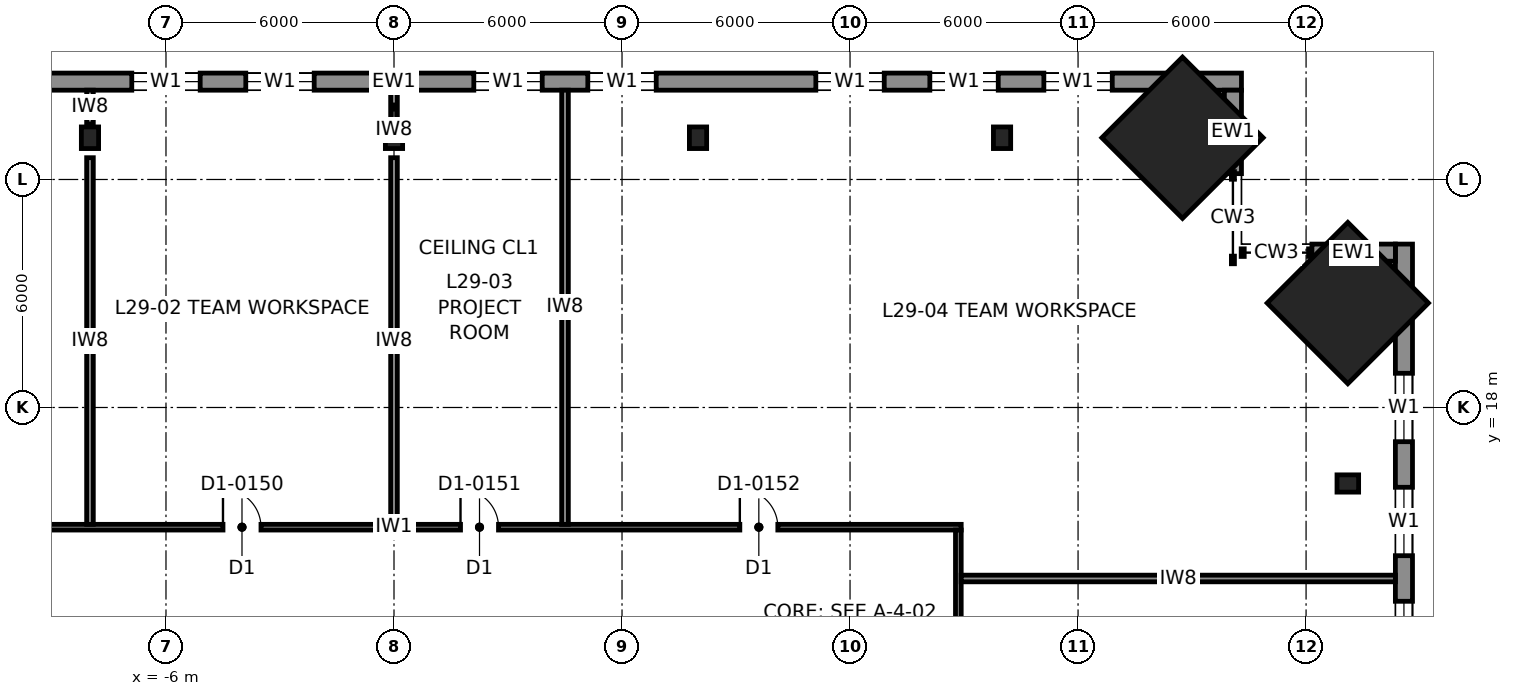
"""IFC4 building model, lengths in metres.
Left out: names, types, materials, properties, quantities, classifications, styles, units other than length and angle.
Written with IfcOpenShell. Run it as: python <this file> out.ifc"""

import sys

from ifc_helpers import new_model, si_unit, direction, frame, frame_2d, origin, origin_2d, place, context, subcontext, project, spatial, rectangle, i_section, extrude, element, fill, save


model = new_model("IFC4")
c1 = context("Model", 3, precision=1e-05, world=origin(), true_north=direction((0.0, 1.0)))
c2 = subcontext(c1, "Body", "Model", "MODEL_VIEW")
j1 = project(units=[si_unit("LENGTHUNIT", "METRE"), si_unit("PLANEANGLEUNIT", "RADIAN")], contexts=[c1])
p1 = place(None, origin())
s1 = spatial("IfcSite", under=j1, at=p1, CompositionType="ELEMENT")
p2 = place(p1, origin())
s2 = spatial("IfcBuilding", under=s1, at=p2, CompositionType="ELEMENT")
p3 = place(p2, frame((0.0, 0.0, 143.8)))
s3 = spatial("IfcBuildingStorey", under=s2, at=p3, CompositionType="ELEMENT", Elevation=143.8)
for number, where, z_axis, x_axis in (
    (1, (20.748, 25.098, 0.0), (-0.04, -0.04, 0.998), (0.708, -0.707, 0.0)),
    (2, (25.098, 20.748, 0.0), (-0.04, -0.04, 0.998), (0.707, -0.708, 0.0)),
):
    element("IfcColumn", number, at=place(p3, frame(where, z_axis=z_axis, x_axis=x_axis)), inside=s3, PredefinedType="COLUMN", context=c2, shape_type="SweptSolid", body=[
        extrude(rectangle(XDim=3.0, YDim=3.0, at=origin_2d()), origin(), (0.0, 0.0, 1.0), 4.007),
    ])
for number, where, z_axis, x_axis in (
    (3, (0.0, 25.098, 0.0), (0.0, -0.04, 0.999), (1.0, 0.0, 0.0)),
    (4, (8.0, 25.098, 0.0), (0.0, -0.04, 0.999), (1.0, 0.0, 0.0)),
    (5, (-8.0, 25.098, 0.0), (0.0, -0.04, 0.999), (1.0, 0.0, 0.0)),
    (6, (16.0, 25.098, 0.0), (0.0, -0.04, 0.999), (1.0, 0.0, 0.0)),
    (7, (25.098, 16.0, 0.0), (-0.04, 0.0, 0.999), (0.0, -1.0, 0.0)),
):
    element("IfcColumn", number, at=place(p3, frame(where, z_axis=z_axis, x_axis=x_axis)), inside=s3, PredefinedType="COLUMN", context=c2, shape_type="SweptSolid", body=[
        extrude(i_section(OverallWidth=0.454, OverallDepth=0.569, WebThickness=0.078, FlangeThickness=0.125, at=origin_2d()), origin(), (0.0, 0.0, 1.0), 4.003),
    ])
p4 = place(p3, frame((22.3, 26.575, 0.0), z_axis=(0.0, 0.0, 1.0), x_axis=(-1.0, 0.0, 0.0)))
e8 = element("IfcWall", 8, at=p4, inside=s3, PredefinedType="SOLIDWALL", context=c2, shape_type="SweptSolid", body=[
    extrude(rectangle(XDim=44.6, YDim=0.45, at=frame_2d((22.3, 0.0))), origin(), (0.0, 0.0, 1.0), 3.83),
])
p5 = place(p4, frame((3.4, 0.0, 0.7)))
e9 = element("IfcOpeningElement", 9, at=p5, cuts=e8, PredefinedType="OPENING", context=c2, shape_type="SweptSolid", body=[
    extrude(rectangle(XDim=1.8, YDim=2.6, at=frame_2d((0.9, 1.3))), frame((0.0, 0.235, 0.0), z_axis=(0.0, -1.0, 0.0), x_axis=(1.0, 0.0, 0.0)), (0.0, 0.0, 1.0), 0.47),
])
p6 = place(p4, frame((6.4, 0.0, 0.7)))
e10 = element("IfcOpeningElement", 10, at=p6, cuts=e8, PredefinedType="OPENING", context=c2, shape_type="SweptSolid", body=[
    extrude(rectangle(XDim=1.8, YDim=2.6, at=frame_2d((0.9, 1.3))), frame((0.0, 0.235, 0.0), z_axis=(0.0, -1.0, 0.0), x_axis=(1.0, 0.0, 0.0)), (0.0, 0.0, 1.0), 0.47),
])
p7 = place(p4, frame((9.4, 0.0, 0.7)))
e11 = element("IfcOpeningElement", 11, at=p7, cuts=e8, PredefinedType="OPENING", context=c2, shape_type="SweptSolid", body=[
    extrude(rectangle(XDim=1.8, YDim=2.6, at=frame_2d((0.9, 1.3))), frame((0.0, 0.235, 0.0), z_axis=(0.0, -1.0, 0.0), x_axis=(1.0, 0.0, 0.0)), (0.0, 0.0, 1.0), 0.47),
])
p8 = place(p4, frame((15.4, 0.0, 0.7)))
e12 = element("IfcOpeningElement", 12, at=p8, cuts=e8, PredefinedType="OPENING", context=c2, shape_type="SweptSolid", body=[
    extrude(rectangle(XDim=1.8, YDim=2.6, at=frame_2d((0.9, 1.3))), frame((0.0, 0.235, 0.0), z_axis=(0.0, -1.0, 0.0), x_axis=(1.0, 0.0, 0.0)), (0.0, 0.0, 1.0), 0.47),
])
p9 = place(p4, frame((18.4, 0.0, 0.7)))
e13 = element("IfcOpeningElement", 13, at=p9, cuts=e8, PredefinedType="OPENING", context=c2, shape_type="SweptSolid", body=[
    extrude(rectangle(XDim=1.8, YDim=2.6, at=frame_2d((0.9, 1.3))), frame((0.0, 0.235, 0.0), z_axis=(0.0, -1.0, 0.0), x_axis=(1.0, 0.0, 0.0)), (0.0, 0.0, 1.0), 0.47),
])
p10 = place(p4, frame((24.4, 0.0, 0.7)))
e14 = element("IfcOpeningElement", 14, at=p10, cuts=e8, PredefinedType="OPENING", context=c2, shape_type="SweptSolid", body=[
    extrude(rectangle(XDim=1.8, YDim=2.6, at=frame_2d((0.9, 1.3))), frame((0.0, 0.235, 0.0), z_axis=(0.0, -1.0, 0.0), x_axis=(1.0, 0.0, 0.0)), (0.0, 0.0, 1.0), 0.47),
])
p11 = place(p4, frame((27.4, 0.0, 0.7)))
e15 = element("IfcOpeningElement", 15, at=p11, cuts=e8, PredefinedType="OPENING", context=c2, shape_type="SweptSolid", body=[
    extrude(rectangle(XDim=1.8, YDim=2.6, at=frame_2d((0.9, 1.3))), frame((0.0, 0.235, 0.0), z_axis=(0.0, -1.0, 0.0), x_axis=(1.0, 0.0, 0.0)), (0.0, 0.0, 1.0), 0.47),
])
p12 = place(p4, frame((33.4, 0.0, 0.7)))
e16 = element("IfcOpeningElement", 16, at=p12, cuts=e8, PredefinedType="OPENING", context=c2, shape_type="SweptSolid", body=[
    extrude(rectangle(XDim=1.8, YDim=2.6, at=frame_2d((0.9, 1.3))), frame((0.0, 0.235, 0.0), z_axis=(0.0, -1.0, 0.0), x_axis=(1.0, 0.0, 0.0)), (0.0, 0.0, 1.0), 0.47),
])
p13 = place(p4, frame((36.4, 0.0, 0.7)))
e17 = element("IfcOpeningElement", 17, at=p13, cuts=e8, PredefinedType="OPENING", context=c2, shape_type="SweptSolid", body=[
    extrude(rectangle(XDim=1.8, YDim=2.6, at=frame_2d((0.9, 1.3))), frame((0.0, 0.235, 0.0), z_axis=(0.0, -1.0, 0.0), x_axis=(1.0, 0.0, 0.0)), (0.0, 0.0, 1.0), 0.47),
])
p14 = place(p4, frame((39.4, 0.0, 0.7)))
e18 = element("IfcOpeningElement", 18, at=p14, cuts=e8, PredefinedType="OPENING", context=c2, shape_type="SweptSolid", body=[
    extrude(rectangle(XDim=1.8, YDim=2.6, at=frame_2d((0.9, 1.3))), frame((0.0, 0.235, 0.0), z_axis=(0.0, -1.0, 0.0), x_axis=(1.0, 0.0, 0.0)), (0.0, 0.0, 1.0), 0.47),
])
p15 = place(p3, frame((26.575, -22.3, 0.0), z_axis=(0.0, 0.0, 1.0), x_axis=(0.0, 1.0, 0.0)))
e19 = element("IfcWall", 19, at=p15, inside=s3, PredefinedType="SOLIDWALL", context=c2, shape_type="SweptSolid", body=[
    extrude(rectangle(XDim=44.6, YDim=0.45, at=frame_2d((22.3, 0.0))), origin(), (0.0, 0.0, 1.0), 3.83),
])
p16 = place(p15, frame((3.4, 0.0, 0.7)))
e20 = element("IfcOpeningElement", 20, at=p16, cuts=e19, PredefinedType="OPENING", context=c2, shape_type="SweptSolid", body=[
    extrude(rectangle(XDim=1.8, YDim=2.6, at=frame_2d((0.9, 1.3))), frame((0.0, 0.235, 0.0), z_axis=(0.0, -1.0, 0.0), x_axis=(1.0, 0.0, 0.0)), (0.0, 0.0, 1.0), 0.47),
])
p17 = place(p15, frame((6.4, 0.0, 0.7)))
e21 = element("IfcOpeningElement", 21, at=p17, cuts=e19, PredefinedType="OPENING", context=c2, shape_type="SweptSolid", body=[
    extrude(rectangle(XDim=1.8, YDim=2.6, at=frame_2d((0.9, 1.3))), frame((0.0, 0.235, 0.0), z_axis=(0.0, -1.0, 0.0), x_axis=(1.0, 0.0, 0.0)), (0.0, 0.0, 1.0), 0.47),
])
p18 = place(p15, frame((9.4, 0.0, 0.7)))
e22 = element("IfcOpeningElement", 22, at=p18, cuts=e19, PredefinedType="OPENING", context=c2, shape_type="SweptSolid", body=[
    extrude(rectangle(XDim=1.8, YDim=2.6, at=frame_2d((0.9, 1.3))), frame((0.0, 0.235, 0.0), z_axis=(0.0, -1.0, 0.0), x_axis=(1.0, 0.0, 0.0)), (0.0, 0.0, 1.0), 0.47),
])
p19 = place(p15, frame((15.4, 0.0, 0.7)))
e23 = element("IfcOpeningElement", 23, at=p19, cuts=e19, PredefinedType="OPENING", context=c2, shape_type="SweptSolid", body=[
    extrude(rectangle(XDim=1.8, YDim=2.6, at=frame_2d((0.9, 1.3))), frame((0.0, 0.235, 0.0), z_axis=(0.0, -1.0, 0.0), x_axis=(1.0, 0.0, 0.0)), (0.0, 0.0, 1.0), 0.47),
])
p20 = place(p15, frame((18.4, 0.0, 0.7)))
e24 = element("IfcOpeningElement", 24, at=p20, cuts=e19, PredefinedType="OPENING", context=c2, shape_type="SweptSolid", body=[
    extrude(rectangle(XDim=1.8, YDim=2.6, at=frame_2d((0.9, 1.3))), frame((0.0, 0.235, 0.0), z_axis=(0.0, -1.0, 0.0), x_axis=(1.0, 0.0, 0.0)), (0.0, 0.0, 1.0), 0.47),
])
p21 = place(p15, frame((24.4, 0.0, 0.7)))
e25 = element("IfcOpeningElement", 25, at=p21, cuts=e19, PredefinedType="OPENING", context=c2, shape_type="SweptSolid", body=[
    extrude(rectangle(XDim=1.8, YDim=2.6, at=frame_2d((0.9, 1.3))), frame((0.0, 0.235, 0.0), z_axis=(0.0, -1.0, 0.0), x_axis=(1.0, 0.0, 0.0)), (0.0, 0.0, 1.0), 0.47),
])
p22 = place(p15, frame((27.4, 0.0, 0.7)))
e26 = element("IfcOpeningElement", 26, at=p22, cuts=e19, PredefinedType="OPENING", context=c2, shape_type="SweptSolid", body=[
    extrude(rectangle(XDim=1.8, YDim=2.6, at=frame_2d((0.9, 1.3))), frame((0.0, 0.235, 0.0), z_axis=(0.0, -1.0, 0.0), x_axis=(1.0, 0.0, 0.0)), (0.0, 0.0, 1.0), 0.47),
])
p23 = place(p15, frame((33.4, 0.0, 0.7)))
e27 = element("IfcOpeningElement", 27, at=p23, cuts=e19, PredefinedType="OPENING", context=c2, shape_type="SweptSolid", body=[
    extrude(rectangle(XDim=1.8, YDim=2.6, at=frame_2d((0.9, 1.3))), frame((0.0, 0.235, 0.0), z_axis=(0.0, -1.0, 0.0), x_axis=(1.0, 0.0, 0.0)), (0.0, 0.0, 1.0), 0.47),
])
p24 = place(p15, frame((36.4, 0.0, 0.7)))
e28 = element("IfcOpeningElement", 28, at=p24, cuts=e19, PredefinedType="OPENING", context=c2, shape_type="SweptSolid", body=[
    extrude(rectangle(XDim=1.8, YDim=2.6, at=frame_2d((0.9, 1.3))), frame((0.0, 0.235, 0.0), z_axis=(0.0, -1.0, 0.0), x_axis=(1.0, 0.0, 0.0)), (0.0, 0.0, 1.0), 0.47),
])
p25 = place(p15, frame((39.4, 0.0, 0.7)))
e29 = element("IfcOpeningElement", 29, at=p25, cuts=e19, PredefinedType="OPENING", context=c2, shape_type="SweptSolid", body=[
    extrude(rectangle(XDim=1.8, YDim=2.6, at=frame_2d((0.9, 1.3))), frame((0.0, 0.235, 0.0), z_axis=(0.0, -1.0, 0.0), x_axis=(1.0, 0.0, 0.0)), (0.0, 0.0, 1.0), 0.47),
])
for number, where, z_axis, x_axis in (
    (30, (22.075, 24.154, 0.0), (0.0, 0.0, 1.0), (0.0, 1.0, 0.0)),
    (31, (24.154, 22.075, 0.0), (0.0, 0.0, 1.0), (1.0, 0.0, 0.0)),
):
    element("IfcWall", number, at=place(p3, frame(where, z_axis=z_axis, x_axis=x_axis)), inside=s3, PredefinedType="SOLIDWALL", context=c2, shape_type="SweptSolid", body=[
        extrude(rectangle(XDim=2.197, YDim=0.45, at=frame_2d((1.098, 0.0))), origin(), (0.0, 0.0, 1.0), 3.83),
    ])
p26 = place(p3, frame((-14.925, 14.85, 0.0), z_axis=(0.0, 0.0, 1.0), x_axis=(1.0, 0.0, 0.0)))
e32 = element("IfcWall", 32, at=p26, inside=s3, PredefinedType="PARTITIONING", context=c2, shape_type="SweptSolid", body=[
    extrude(rectangle(XDim=29.85, YDim=0.15, at=frame_2d((14.925, 0.0))), origin(), (0.0, 0.0, 1.0), 3.83),
])
p27 = place(p26, frame((3.125, 0.0, 0.0)))
e33 = element("IfcOpeningElement", 33, at=p27, cuts=e32, PredefinedType="OPENING", context=c2, shape_type="SweptSolid", body=[
    extrude(rectangle(XDim=1.0, YDim=2.3, at=frame_2d((0.5, 1.15))), frame((0.0, 0.085, 0.0), z_axis=(0.0, -1.0, 0.0), x_axis=(1.0, 0.0, 0.0)), (0.0, 0.0, 1.0), 0.17),
])
p28 = place(p26, frame((10.425, 0.0, 0.0)))
e34 = element("IfcOpeningElement", 34, at=p28, cuts=e32, PredefinedType="OPENING", context=c2, shape_type="SweptSolid", body=[
    extrude(rectangle(XDim=1.0, YDim=2.3, at=frame_2d((0.5, 1.15))), frame((0.0, 0.085, 0.0), z_axis=(0.0, -1.0, 0.0), x_axis=(1.0, 0.0, 0.0)), (0.0, 0.0, 1.0), 0.17),
])
p29 = place(p26, frame((16.675, 0.0, 0.0)))
e35 = element("IfcOpeningElement", 35, at=p29, cuts=e32, PredefinedType="OPENING", context=c2, shape_type="SweptSolid", body=[
    extrude(rectangle(XDim=1.0, YDim=2.3, at=frame_2d((0.5, 1.15))), frame((0.0, 0.085, 0.0), z_axis=(0.0, -1.0, 0.0), x_axis=(1.0, 0.0, 0.0)), (0.0, 0.0, 1.0), 0.17),
])
p30 = place(p26, frame((24.025, 0.0, 0.0)))
e36 = element("IfcOpeningElement", 36, at=p30, cuts=e32, PredefinedType="OPENING", context=c2, shape_type="SweptSolid", body=[
    extrude(rectangle(XDim=1.0, YDim=2.3, at=frame_2d((0.5, 1.15))), frame((0.0, 0.085, 0.0), z_axis=(0.0, -1.0, 0.0), x_axis=(1.0, 0.0, 0.0)), (0.0, 0.0, 1.0), 0.17),
])
p31 = place(p3, frame((14.85, -13.575, 0.0), z_axis=(0.0, 0.0, 1.0), x_axis=(0.0, 1.0, 0.0)))
e37 = element("IfcWall", 37, at=p31, inside=s3, PredefinedType="PARTITIONING", context=c2, shape_type="SweptSolid", body=[
    extrude(rectangle(XDim=28.35, YDim=0.15, at=frame_2d((14.175, 0.0))), origin(), (0.0, 0.0, 1.0), 3.83),
])
p32 = place(p31, frame((3.175, 0.0, 0.0)))
e38 = element("IfcOpeningElement", 38, at=p32, cuts=e37, PredefinedType="OPENING", context=c2, shape_type="SweptSolid", body=[
    extrude(rectangle(XDim=1.0, YDim=2.3, at=frame_2d((0.5, 1.15))), frame((0.0, 0.085, 0.0), z_axis=(0.0, -1.0, 0.0), x_axis=(1.0, 0.0, 0.0)), (0.0, 0.0, 1.0), 0.17),
])
p33 = place(p31, frame((7.375, 0.0, 0.0)))
e39 = element("IfcOpeningElement", 39, at=p33, cuts=e37, PredefinedType="OPENING", context=c2, shape_type="SweptSolid", body=[
    extrude(rectangle(XDim=1.0, YDim=2.3, at=frame_2d((0.5, 1.15))), frame((0.0, 0.085, 0.0), z_axis=(0.0, -1.0, 0.0), x_axis=(1.0, 0.0, 0.0)), (0.0, 0.0, 1.0), 0.17),
])
p34 = place(p31, frame((19.275, 0.0, 0.0)))
e40 = element("IfcOpeningElement", 40, at=p34, cuts=e37, PredefinedType="OPENING", context=c2, shape_type="SweptSolid", body=[
    extrude(rectangle(XDim=1.0, YDim=2.3, at=frame_2d((0.5, 1.15))), frame((0.0, 0.085, 0.0), z_axis=(0.0, -1.0, 0.0), x_axis=(1.0, 0.0, 0.0)), (0.0, 0.0, 1.0), 0.17),
])
p35 = place(p31, frame((23.725, 0.0, 0.0)))
e41 = element("IfcOpeningElement", 41, at=p35, cuts=e37, PredefinedType="OPENING", context=c2, shape_type="SweptSolid", body=[
    extrude(rectangle(XDim=1.0, YDim=2.3, at=frame_2d((0.5, 1.15))), frame((0.0, 0.085, 0.0), z_axis=(0.0, -1.0, 0.0), x_axis=(1.0, 0.0, 0.0)), (0.0, 0.0, 1.0), 0.17),
])
p36 = place(p31, frame((15.825, 0.0, 0.0)))
e42 = element("IfcOpeningElement", 42, at=p36, cuts=e37, PredefinedType="OPENING", context=c2, shape_type="SweptSolid", body=[
    extrude(rectangle(XDim=1.0, YDim=2.3, at=frame_2d((0.5, 1.15))), frame((0.0, 0.085, 0.0), z_axis=(0.0, -1.0, 0.0), x_axis=(1.0, 0.0, 0.0)), (0.0, 0.0, 1.0), 0.17),
])
p37 = place(p31, frame((11.075, 0.0, 0.0)))
e43 = element("IfcOpeningElement", 43, at=p37, cuts=e37, PredefinedType="OPENING", context=c2, shape_type="SweptSolid", body=[
    extrude(rectangle(XDim=1.0, YDim=2.3, at=frame_2d((0.5, 1.15))), frame((0.0, 0.085, 0.0), z_axis=(0.0, -1.0, 0.0), x_axis=(1.0, 0.0, 0.0)), (0.0, 0.0, 1.0), 0.17),
])
p38 = place(p3, frame((14.925, 13.5, 0.0), z_axis=(0.0, 0.0, 1.0), x_axis=(1.0, 0.0, 0.0)))
e44 = element("IfcWall", 44, at=p38, inside=s3, PredefinedType="PARTITIONING", context=c2, shape_type="SweptSolid", body=[
    extrude(rectangle(XDim=11.425, YDim=0.175, at=frame_2d((5.712, 0.0))), origin(), (0.0, 0.0, 1.0), 3.83),
])
p39 = place(p3, frame((-8.0, 14.925, 0.0), z_axis=(0.0, 0.0, 1.0), x_axis=(0.0, 1.0, 0.0)))
e45 = element("IfcWall", 45, at=p39, inside=s3, PredefinedType="PARTITIONING", context=c2, shape_type="SweptSolid", body=[
    extrude(rectangle(XDim=9.648, YDim=0.175, at=frame_2d((4.824, 0.0))), origin(), (0.0, 0.0, 1.0), 2.83),
])
p40 = place(p3, frame((-8.0, 25.462, 0.0), z_axis=(0.0, 0.0, 1.0), x_axis=(0.0, 1.0, 0.0)))
e46 = element("IfcWall", 46, at=p40, inside=s3, PredefinedType="PARTITIONING", context=c2, shape_type="SweptSolid", body=[
    extrude(rectangle(XDim=0.888, YDim=0.175, at=frame_2d((0.444, 0.0))), origin(), (0.0, 0.0, 1.0), 3.83),
])
p41 = place(p3, frame((0.0, 14.925, 0.0), z_axis=(0.0, 0.0, 1.0), x_axis=(0.0, 1.0, 0.0)))
e47 = element("IfcWall", 47, at=p41, inside=s3, PredefinedType="PARTITIONING", context=c2, shape_type="SweptSolid", body=[
    extrude(rectangle(XDim=9.648, YDim=0.175, at=frame_2d((4.824, 0.0))), origin(), (0.0, 0.0, 1.0), 2.83),
])
p42 = place(p3, frame((0.0, 25.462, 0.0), z_axis=(0.0, 0.0, 1.0), x_axis=(0.0, 1.0, 0.0)))
e48 = element("IfcWall", 48, at=p42, inside=s3, PredefinedType="PARTITIONING", context=c2, shape_type="SweptSolid", body=[
    extrude(rectangle(XDim=0.888, YDim=0.175, at=frame_2d((0.444, 0.0))), origin(), (0.0, 0.0, 1.0), 3.83),
])
p43 = place(p3, frame((4.5, 14.925, 0.0), z_axis=(0.0, 0.0, 1.0), x_axis=(0.0, 1.0, 0.0)))
e49 = element("IfcWall", 49, at=p43, inside=s3, PredefinedType="PARTITIONING", context=c2, shape_type="SweptSolid", body=[
    extrude(rectangle(XDim=11.425, YDim=0.175, at=frame_2d((5.712, 0.0))), origin(), (0.0, 0.0, 1.0), 3.83),
])
p44 = place(p5, origin())
e50 = element("IfcWindow", 50, at=p44, inside=s3, PartitioningType="SINGLE_PANEL", PredefinedType="WINDOW", context=c2, shape_type="SweptSolid", body=[
    extrude(rectangle(XDim=1.8, YDim=2.6, at=frame_2d((0.9, 1.3))), frame((0.0, 0.03, 0.0), z_axis=(0.0, -1.0, 0.0), x_axis=(1.0, 0.0, 0.0)), (0.0, 0.0, 1.0), 0.06),
])
fill(e9, e50)
p45 = place(p6, origin())
e51 = element("IfcWindow", 51, at=p45, inside=s3, PartitioningType="SINGLE_PANEL", PredefinedType="WINDOW", context=c2, shape_type="SweptSolid", body=[
    extrude(rectangle(XDim=1.8, YDim=2.6, at=frame_2d((0.9, 1.3))), frame((0.0, 0.03, 0.0), z_axis=(0.0, -1.0, 0.0), x_axis=(1.0, 0.0, 0.0)), (0.0, 0.0, 1.0), 0.06),
])
fill(e10, e51)
p46 = place(p7, origin())
e52 = element("IfcWindow", 52, at=p46, inside=s3, PartitioningType="SINGLE_PANEL", PredefinedType="WINDOW", context=c2, shape_type="SweptSolid", body=[
    extrude(rectangle(XDim=1.8, YDim=2.6, at=frame_2d((0.9, 1.3))), frame((0.0, 0.03, 0.0), z_axis=(0.0, -1.0, 0.0), x_axis=(1.0, 0.0, 0.0)), (0.0, 0.0, 1.0), 0.06),
])
fill(e11, e52)
p47 = place(p8, origin())
e53 = element("IfcWindow", 53, at=p47, inside=s3, PartitioningType="SINGLE_PANEL", PredefinedType="WINDOW", context=c2, shape_type="SweptSolid", body=[
    extrude(rectangle(XDim=1.8, YDim=2.6, at=frame_2d((0.9, 1.3))), frame((0.0, 0.03, 0.0), z_axis=(0.0, -1.0, 0.0), x_axis=(1.0, 0.0, 0.0)), (0.0, 0.0, 1.0), 0.06),
])
fill(e12, e53)
p48 = place(p9, origin())
e54 = element("IfcWindow", 54, at=p48, inside=s3, PartitioningType="SINGLE_PANEL", PredefinedType="WINDOW", context=c2, shape_type="SweptSolid", body=[
    extrude(rectangle(XDim=1.8, YDim=2.6, at=frame_2d((0.9, 1.3))), frame((0.0, 0.03, 0.0), z_axis=(0.0, -1.0, 0.0), x_axis=(1.0, 0.0, 0.0)), (0.0, 0.0, 1.0), 0.06),
])
fill(e13, e54)
p49 = place(p10, origin())
e55 = element("IfcWindow", 55, at=p49, inside=s3, PartitioningType="SINGLE_PANEL", PredefinedType="WINDOW", context=c2, shape_type="SweptSolid", body=[
    extrude(rectangle(XDim=1.8, YDim=2.6, at=frame_2d((0.9, 1.3))), frame((0.0, 0.03, 0.0), z_axis=(0.0, -1.0, 0.0), x_axis=(1.0, 0.0, 0.0)), (0.0, 0.0, 1.0), 0.06),
])
fill(e14, e55)
p50 = place(p11, origin())
e56 = element("IfcWindow", 56, at=p50, inside=s3, PartitioningType="SINGLE_PANEL", PredefinedType="WINDOW", context=c2, shape_type="SweptSolid", body=[
    extrude(rectangle(XDim=1.8, YDim=2.6, at=frame_2d((0.9, 1.3))), frame((0.0, 0.03, 0.0), z_axis=(0.0, -1.0, 0.0), x_axis=(1.0, 0.0, 0.0)), (0.0, 0.0, 1.0), 0.06),
])
fill(e15, e56)
p51 = place(p23, origin())
e57 = element("IfcWindow", 57, at=p51, inside=s3, PartitioningType="SINGLE_PANEL", PredefinedType="WINDOW", context=c2, shape_type="SweptSolid", body=[
    extrude(rectangle(XDim=1.8, YDim=2.6, at=frame_2d((0.9, 1.3))), frame((0.0, 0.03, 0.0), z_axis=(0.0, -1.0, 0.0), x_axis=(1.0, 0.0, 0.0)), (0.0, 0.0, 1.0), 0.06),
])
fill(e27, e57)
p52 = place(p24, origin())
e58 = element("IfcWindow", 58, at=p52, inside=s3, PartitioningType="SINGLE_PANEL", PredefinedType="WINDOW", context=c2, shape_type="SweptSolid", body=[
    extrude(rectangle(XDim=1.8, YDim=2.6, at=frame_2d((0.9, 1.3))), frame((0.0, 0.03, 0.0), z_axis=(0.0, -1.0, 0.0), x_axis=(1.0, 0.0, 0.0)), (0.0, 0.0, 1.0), 0.06),
])
fill(e28, e58)
p53 = place(p25, origin())
e59 = element("IfcWindow", 59, at=p53, inside=s3, PartitioningType="SINGLE_PANEL", PredefinedType="WINDOW", context=c2, shape_type="SweptSolid", body=[
    extrude(rectangle(XDim=1.8, YDim=2.6, at=frame_2d((0.9, 1.3))), frame((0.0, 0.03, 0.0), z_axis=(0.0, -1.0, 0.0), x_axis=(1.0, 0.0, 0.0)), (0.0, 0.0, 1.0), 0.06),
])
fill(e29, e59)
p54 = place(p28, origin())
e60 = element("IfcDoor", 60, at=p54, inside=s3, OperationType="SINGLE_SWING_LEFT", PredefinedType="DOOR", context=c2, shape_type="SweptSolid", body=[
    extrude(rectangle(XDim=1.0, YDim=2.3, at=frame_2d((0.5, 1.15))), frame((0.0, 0.025, 0.0), z_axis=(0.0, -1.0, 0.0), x_axis=(1.0, 0.0, 0.0)), (0.0, 0.0, 1.0), 0.05),
])
fill(e34, e60)
p55 = place(p29, origin())
e61 = element("IfcDoor", 61, at=p55, inside=s3, OperationType="SINGLE_SWING_LEFT", PredefinedType="DOOR", context=c2, shape_type="SweptSolid", body=[
    extrude(rectangle(XDim=1.0, YDim=2.3, at=frame_2d((0.5, 1.15))), frame((0.0, 0.025, 0.0), z_axis=(0.0, -1.0, 0.0), x_axis=(1.0, 0.0, 0.0)), (0.0, 0.0, 1.0), 0.05),
])
fill(e35, e61)
p56 = place(p30, origin())
e62 = element("IfcDoor", 62, at=p56, inside=s3, OperationType="SINGLE_SWING_LEFT", PredefinedType="DOOR", context=c2, shape_type="SweptSolid", body=[
    extrude(rectangle(XDim=1.0, YDim=2.3, at=frame_2d((0.5, 1.15))), frame((0.0, 0.025, 0.0), z_axis=(0.0, -1.0, 0.0), x_axis=(1.0, 0.0, 0.0)), (0.0, 0.0, 1.0), 0.05),
])
fill(e36, e62)
save(model, sys.argv[1])
